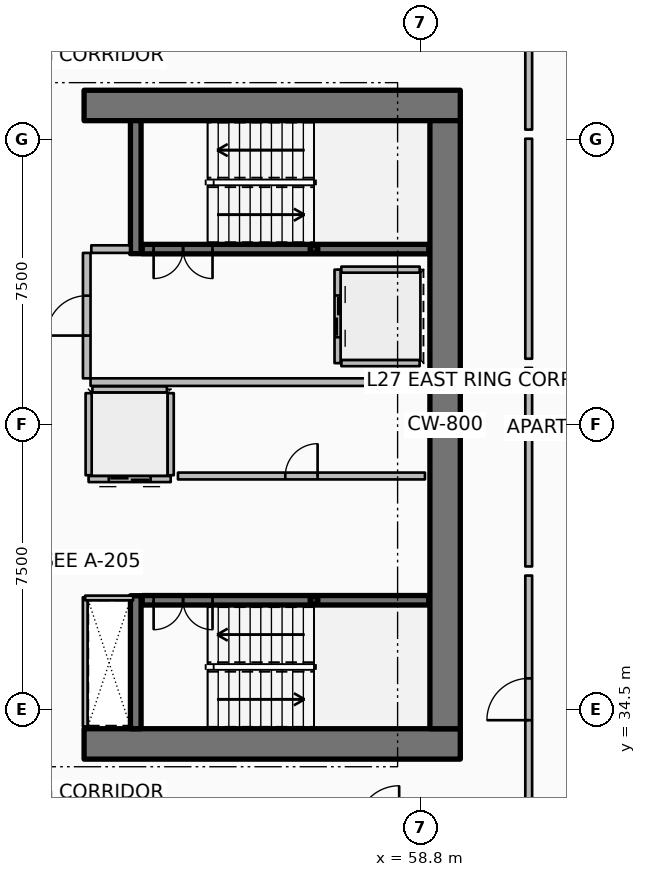
"""IFC4 building model, lengths in metres.
Left out: names, types, materials, properties, quantities, classifications, styles, units other than length and angle.
Written with IfcOpenShell. Run it as: python <this file> out.ifc"""

import sys

from ifc_helpers import new_model, si_unit, direction, frame, frame_2d, origin, origin_2d, place, context, subcontext, project, spatial, rectangle, hollow_rectangle, extrude, element, fill, save


model = new_model("IFC4")
c1 = context("Model", 3, precision=1e-05, world=origin(), true_north=direction((0.0, 1.0)))
c2 = subcontext(c1, "Body", "Model", "MODEL_VIEW")
j1 = project(units=[si_unit("LENGTHUNIT", "METRE"), si_unit("PLANEANGLEUNIT", "RADIAN")], contexts=[c1])
p1 = place(None, origin())
s1 = spatial("IfcSite", under=j1, at=p1, CompositionType="ELEMENT")
p2 = place(p1, origin())
s2 = spatial("IfcBuilding", under=s1, at=p2, CompositionType="ELEMENT")
p3 = place(p2, frame((0.0, 0.0, 108.9)))
s3 = spatial("IfcBuildingStorey", under=s2, at=p3, CompositionType="ELEMENT", Elevation=108.9)
for number, where, z_axis, x_axis in (
    (1, (49.95, 33.6, 0.0), (0.0, 0.0, 1.0), (1.0, 0.0, 0.0)),
    (2, (49.95, 50.4, 0.0), (0.0, 0.0, 1.0), (1.0, 0.0, 0.0)),
):
    element("IfcWall", number, at=place(p3, frame(where, z_axis=z_axis, x_axis=x_axis)), inside=s3, PredefinedType="SHEAR", context=c2, shape_type="SweptSolid", body=[
        extrude(rectangle(XDim=9.9, YDim=0.8, at=frame_2d((4.95, 0.0))), origin(), (0.0, 0.0, 1.0), 3.75),
    ])
p4 = place(p3, frame((59.45, 34.0, 0.0), z_axis=(0.0, 0.0, 1.0), x_axis=(0.0, 1.0, 0.0)))
e3 = element("IfcWall", 3, at=p4, inside=s3, PredefinedType="SHEAR", context=c2, shape_type="SweptSolid", body=[
    extrude(rectangle(XDim=16.0, YDim=0.8, at=frame_2d((8.0, 0.0))), origin(), (0.0, 0.0, 1.0), 3.75),
])
for number, where, z_axis, x_axis in (
    (4, (51.31, 46.5, 0.0), (0.0, 0.0, 1.0), (0.0, 1.0, 0.0)),
    (5, (51.31, 34.0, 0.0), (0.0, 0.0, 1.0), (0.0, 1.0, 0.0)),
):
    element("IfcWall", number, at=place(p3, frame(where, z_axis=z_axis, x_axis=x_axis)), inside=s3, PredefinedType="SHEAR", context=c2, shape_type="SweptSolid", body=[
        extrude(rectangle(XDim=3.5, YDim=0.28, at=frame_2d((1.75, 0.0))), origin(), (0.0, 0.0, 1.0), 3.75),
    ])
for number, where, z_axis, x_axis in (
    (6, (56.0, 46.62, 0.0), (0.0, 0.0, 1.0), (1.0, 0.0, 0.0)),
    (7, (56.0, 37.38, 0.0), (0.0, 0.0, 1.0), (1.0, 0.0, 0.0)),
):
    element("IfcColumn", number, at=place(p3, frame(where, z_axis=z_axis, x_axis=x_axis)), inside=s3, PredefinedType="COLUMN", context=c2, shape_type="SweptSolid", body=[
        extrude(hollow_rectangle(XDim=0.2, YDim=0.2, WallThickness=0.01, InnerFilletRadius=0.01, OuterFilletRadius=0.02, at=origin_2d()), origin(), (0.0, 0.0, 1.0), 1.67),
    ])
p5 = place(p3, frame((51.48, 46.62, 0.0), z_axis=(0.0, 0.0, 1.0), x_axis=(1.0, 0.0, 0.0)))
e8 = element("IfcWall", 8, at=p5, inside=s3, PredefinedType="SOLIDWALL", context=c2, shape_type="SweptSolid", body=[
    extrude(rectangle(XDim=7.54, YDim=0.25, at=frame_2d((3.77, 0.0))), origin(), (0.0, 0.0, 1.0), 3.5),
])
p6 = place(p5, frame((0.3, 0.0, 0.0)))
e9 = element("IfcOpeningElement", 9, at=p6, cuts=e8, PredefinedType="OPENING", context=c2, shape_type="SweptSolid", body=[
    extrude(rectangle(XDim=1.55, YDim=2.15, at=frame_2d((0.775, 1.075))), frame((0.0, 0.135, 0.0), z_axis=(0.0, -1.0, 0.0), x_axis=(1.0, 0.0, 0.0)), (0.0, 0.0, 1.0), 0.27),
])
p7 = place(p3, frame((51.48, 37.38, 0.0), z_axis=(0.0, 0.0, 1.0), x_axis=(1.0, 0.0, 0.0)))
e10 = element("IfcWall", 10, at=p7, inside=s3, PredefinedType="SOLIDWALL", context=c2, shape_type="SweptSolid", body=[
    extrude(rectangle(XDim=7.54, YDim=0.25, at=frame_2d((3.77, 0.0))), origin(), (0.0, 0.0, 1.0), 3.5),
])
p8 = place(p7, frame((0.3, 0.0, 0.0)))
e11 = element("IfcOpeningElement", 11, at=p8, cuts=e10, PredefinedType="OPENING", context=c2, shape_type="SweptSolid", body=[
    extrude(rectangle(XDim=1.55, YDim=2.15, at=frame_2d((0.775, 1.075))), frame((0.0, 0.135, 0.0), z_axis=(0.0, -1.0, 0.0), x_axis=(1.0, 0.0, 0.0)), (0.0, 0.0, 1.0), 0.27),
])
p9 = place(p3, frame((56.62, 46.08, 0.0), z_axis=(0.0, 0.0, 1.0), x_axis=(0.0, -1.0, 0.0)))
e12 = element("IfcWall", 12, at=p9, inside=s3, PredefinedType="PARTITIONING", context=c2, shape_type="SweptSolid", body=[
    extrude(rectangle(XDim=2.46, YDim=0.16, at=frame_2d((1.23, 0.0))), origin(), (0.0, 0.0, 1.0), 3.5),
])
p10 = place(p9, frame((0.68, 0.0, 0.0)))
e13 = element("IfcOpeningElement", 13, at=p10, cuts=e12, PredefinedType="OPENING", context=c2, shape_type="SweptSolid", body=[
    extrude(rectangle(XDim=1.1, YDim=2.1, at=frame_2d((0.55, 1.05))), frame((0.0, 0.09, 0.0), z_axis=(0.0, -1.0, 0.0), x_axis=(1.0, 0.0, 0.0)), (0.0, 0.0, 1.0), 0.18),
])
for number, where, z_axis, x_axis in (
    (14, (56.72, 46.08, 0.0), (0.0, 0.0, 1.0), (1.0, 0.0, 0.0)),
    (15, (56.72, 43.62, 0.0), (0.0, 0.0, 1.0), (1.0, 0.0, 0.0)),
):
    element("IfcWall", number, at=place(p3, frame(where, z_axis=z_axis, x_axis=x_axis)), inside=s3, PredefinedType="PARTITIONING", context=c2, shape_type="SweptSolid", body=[
        extrude(rectangle(XDim=2.06, YDim=0.16, at=frame_2d((1.03, 0.0))), origin(), (0.0, 0.0, 1.0), 3.5),
    ])
p11 = place(p3, frame((52.23, 40.57, 0.0), z_axis=(0.0, 0.0, 1.0), x_axis=(-1.0, 0.0, 0.0)))
e16 = element("IfcWall", 16, at=p11, inside=s3, PredefinedType="PARTITIONING", context=c2, shape_type="SweptSolid", body=[
    extrude(rectangle(XDim=2.16, YDim=0.16, at=frame_2d((1.08, 0.0))), origin(), (0.0, 0.0, 1.0), 3.5),
])
p12 = place(p11, frame((0.53, 0.0, 0.0)))
e17 = element("IfcOpeningElement", 17, at=p12, cuts=e16, PredefinedType="OPENING", context=c2, shape_type="SweptSolid", body=[
    extrude(rectangle(XDim=1.1, YDim=2.1, at=frame_2d((0.55, 1.05))), frame((0.0, 0.09, 0.0), z_axis=(0.0, -1.0, 0.0), x_axis=(1.0, 0.0, 0.0)), (0.0, 0.0, 1.0), 0.18),
])
for number, where, z_axis, x_axis in (
    (18, (52.23, 40.67, 0.0), (0.0, 0.0, 1.0), (0.0, 1.0, 0.0)),
    (19, (50.07, 40.67, 0.0), (0.0, 0.0, 1.0), (0.0, 1.0, 0.0)),
):
    element("IfcWall", number, at=place(p3, frame(where, z_axis=z_axis, x_axis=x_axis)), inside=s3, PredefinedType="PARTITIONING", context=c2, shape_type="SweptSolid", body=[
        extrude(rectangle(XDim=2.16, YDim=0.16, at=frame_2d((1.08, 0.0))), origin(), (0.0, 0.0, 1.0), 3.5),
    ])
p13 = place(p3, frame((50.17, 42.93, 0.0), z_axis=(0.0, 0.0, 1.0), x_axis=(1.0, 0.0, 0.0)))
e20 = element("IfcWall", 20, at=p13, inside=s3, PredefinedType="PARTITIONING", context=c2, shape_type="SweptSolid", body=[
    extrude(rectangle(XDim=1.96, YDim=0.16, at=frame_2d((0.98, 0.0))), origin(), (0.0, 0.0, 1.0), 3.5),
])
p14 = place(p3, frame((52.42, 40.65, 0.0), z_axis=(0.0, 0.0, 1.0), x_axis=(1.0, 0.0, 0.0)))
e21 = element("IfcWall", 21, at=p14, inside=s3, PredefinedType="PARTITIONING", context=c2, shape_type="SweptSolid", body=[
    extrude(rectangle(XDim=6.5, YDim=0.18, at=frame_2d((3.25, 0.0))), origin(), (0.0, 0.0, 1.0), 3.5),
])
p15 = place(p14, frame((2.825, 0.0, 0.0)))
e22 = element("IfcOpeningElement", 22, at=p15, cuts=e21, PredefinedType="OPENING", context=c2, shape_type="SweptSolid", body=[
    extrude(rectangle(XDim=0.85, YDim=2.06, at=frame_2d((0.425, 1.03))), frame((0.0, 0.1, 0.0), z_axis=(0.0, -1.0, 0.0), x_axis=(1.0, 0.0, 0.0)), (0.0, 0.0, 1.0), 0.2),
])
p16 = place(p3, frame((50.12, 43.12, 0.0), z_axis=(0.0, 0.0, 1.0), x_axis=(1.0, 0.0, 0.0)))
e23 = element("IfcWall", 23, at=p16, inside=s3, PredefinedType="PARTITIONING", context=c2, shape_type="SweptSolid", body=[
    extrude(rectangle(XDim=8.88, YDim=0.2, at=frame_2d((4.44, 0.0))), origin(), (0.0, 0.0, 1.0), 3.5),
])
p17 = place(p3, frame((50.14, 46.62, 0.0), z_axis=(0.0, 0.0, 1.0), x_axis=(1.0, 0.0, 0.0)))
e24 = element("IfcWall", 24, at=p17, inside=s3, PredefinedType="PARTITIONING", context=c2, shape_type="SweptSolid", body=[
    extrude(rectangle(XDim=1.02, YDim=0.2, at=frame_2d((0.51, 0.0))), origin(), (0.0, 0.0, 1.0), 3.5),
])
p18 = place(p3, frame((50.02, 43.22, 0.0), z_axis=(0.0, 0.0, 1.0), x_axis=(0.0, 1.0, 0.0)))
e25 = element("IfcWall", 25, at=p18, inside=s3, PredefinedType="PARTITIONING", context=c2, shape_type="SweptSolid", body=[
    extrude(rectangle(XDim=3.3, YDim=0.2, at=frame_2d((1.65, 0.0))), origin(), (0.0, 0.0, 1.0), 3.5),
])
p19 = place(p18, frame((1.125, 0.0, 0.0)))
e26 = element("IfcOpeningElement", 26, at=p19, cuts=e25, PredefinedType="OPENING", context=c2, shape_type="SweptSolid", body=[
    extrude(rectangle(XDim=1.05, YDim=2.1, at=frame_2d((0.525, 1.05))), frame((0.0, 0.11, 0.0), z_axis=(0.0, -1.0, 0.0), x_axis=(1.0, 0.0, 0.0)), (0.0, 0.0, 1.0), 0.22),
])
p20 = place(p3, frame((49.98, 34.06, 0.0), z_axis=(0.0, 0.0, 1.0), x_axis=(0.0, 1.0, 0.0)))
e27 = element("IfcWall", 27, at=p20, inside=s3, PredefinedType="PARTITIONING", context=c2, shape_type="SweptSolid", body=[
    extrude(rectangle(XDim=3.4, YDim=0.125, at=frame_2d((1.7, 0.0))), origin(), (0.0, 0.0, 1.0), 2.94),
])
p21 = place(p3, frame((49.98, 37.44, 0.0), z_axis=(0.0, 0.0, 1.0), x_axis=(1.0, 0.0, 0.0)))
e28 = element("IfcWall", 28, at=p21, inside=s3, PredefinedType="PARTITIONING", context=c2, shape_type="SweptSolid", body=[
    extrude(rectangle(XDim=1.26, YDim=0.125, at=frame_2d((0.63, 0.0))), origin(), (0.0, 0.0, 1.0), 2.94),
])
p22 = place(p3, frame((61.65, 31.52, 0.0), z_axis=(0.0, 0.0, 1.0), x_axis=(0.0, 1.0, 0.0)))
e29 = element("IfcWall", 29, at=p22, inside=s3, PredefinedType="PARTITIONING", context=c2, shape_type="SweptSolid", body=[
    extrude(rectangle(XDim=6.51, YDim=0.18, at=frame_2d((3.255, 0.0))), origin(), (0.0, 0.0, 1.0), 2.94),
])
p23 = place(p22, frame((2.705, 0.0, 0.0)))
e30 = element("IfcOpeningElement", 30, at=p23, cuts=e29, PredefinedType="OPENING", context=c2, shape_type="SweptSolid", body=[
    extrude(rectangle(XDim=1.1, YDim=2.1, at=frame_2d((0.55, 1.05))), frame((0.0, 0.1, 0.0), z_axis=(0.0, -1.0, 0.0), x_axis=(1.0, 0.0, 0.0)), (0.0, 0.0, 1.0), 0.2),
])
p24 = place(p3, frame((61.65, 38.27, 0.0), z_axis=(0.0, 0.0, 1.0), x_axis=(0.0, 1.0, 0.0)))
e31 = element("IfcWall", 31, at=p24, inside=s3, PredefinedType="PARTITIONING", context=c2, shape_type="SweptSolid", body=[
    extrude(rectangle(XDim=5.225, YDim=0.18, at=frame_2d((2.613, 0.0))), origin(), (0.0, 0.0, 1.0), 2.94),
])
p25 = place(p3, frame((61.65, 43.736, 0.0), z_axis=(0.0, 0.0, 1.0), x_axis=(0.0, 1.0, 0.0)))
e32 = element("IfcWall", 32, at=p25, inside=s3, PredefinedType="PARTITIONING", context=c2, shape_type="SweptSolid", body=[
    extrude(rectangle(XDim=5.789, YDim=0.18, at=frame_2d((2.895, 0.0))), origin(), (0.0, 0.0, 1.0), 2.94),
])
p26 = place(p3, frame((61.65, 49.764, 0.0), z_axis=(0.0, 0.0, 1.0), x_axis=(0.0, 1.0, 0.0)))
e33 = element("IfcWall", 33, at=p26, inside=s3, PredefinedType="PARTITIONING", context=c2, shape_type="SweptSolid", body=[
    extrude(rectangle(XDim=2.716, YDim=0.18, at=frame_2d((1.358, 0.0))), origin(), (0.0, 0.0, 1.0), 2.94),
])
p27 = place(p6, origin())
e34 = element("IfcDoor", 34, at=p27, inside=s3, OperationType="DOUBLE_DOOR_SINGLE_SWING", PredefinedType="DOOR", context=c2, shape_type="SweptSolid", body=[
    extrude(rectangle(XDim=1.55, YDim=2.15, at=frame_2d((0.775, 1.075))), frame((0.0, 0.025, 0.0), z_axis=(0.0, -1.0, 0.0), x_axis=(1.0, 0.0, 0.0)), (0.0, 0.0, 1.0), 0.05),
])
fill(e9, e34)
p28 = place(p8, origin())
e35 = element("IfcDoor", 35, at=p28, inside=s3, OperationType="DOUBLE_DOOR_SINGLE_SWING", PredefinedType="DOOR", context=c2, shape_type="SweptSolid", body=[
    extrude(rectangle(XDim=1.55, YDim=2.15, at=frame_2d((0.775, 1.075))), frame((0.0, 0.025, 0.0), z_axis=(0.0, -1.0, 0.0), x_axis=(1.0, 0.0, 0.0)), (0.0, 0.0, 1.0), 0.05),
])
fill(e11, e35)
p29 = place(p10, origin())
e36 = element("IfcDoor", 36, at=p29, inside=s3, OperationType="DOUBLE_DOOR_SLIDING", PredefinedType="DOOR", context=c2, shape_type="SweptSolid", body=[
    extrude(rectangle(XDim=1.1, YDim=2.1, at=frame_2d((0.55, 1.05))), frame((0.0, 0.025, 0.0), z_axis=(0.0, -1.0, 0.0), x_axis=(1.0, 0.0, 0.0)), (0.0, 0.0, 1.0), 0.05),
])
fill(e13, e36)
p30 = place(p12, origin())
e37 = element("IfcDoor", 37, at=p30, inside=s3, OperationType="DOUBLE_DOOR_SLIDING", PredefinedType="DOOR", context=c2, shape_type="SweptSolid", body=[
    extrude(rectangle(XDim=1.1, YDim=2.1, at=frame_2d((0.55, 1.05))), frame((0.0, 0.025, 0.0), z_axis=(0.0, -1.0, 0.0), x_axis=(1.0, 0.0, 0.0)), (0.0, 0.0, 1.0), 0.05),
])
fill(e17, e37)
p31 = place(p15, origin())
e38 = element("IfcDoor", 38, at=p31, inside=s3, OperationType="SINGLE_SWING_RIGHT", PredefinedType="DOOR", context=c2, shape_type="SweptSolid", body=[
    extrude(rectangle(XDim=0.85, YDim=2.06, at=frame_2d((0.425, 1.03))), frame((0.0, 0.025, 0.0), z_axis=(0.0, -1.0, 0.0), x_axis=(1.0, 0.0, 0.0)), (0.0, 0.0, 1.0), 0.05),
])
fill(e22, e38)
p32 = place(p19, origin())
e39 = element("IfcDoor", 39, at=p32, inside=s3, OperationType="SINGLE_SWING_LEFT", PredefinedType="DOOR", context=c2, shape_type="SweptSolid", body=[
    extrude(rectangle(XDim=1.05, YDim=2.1, at=frame_2d((0.525, 1.05))), frame((0.0, 0.025, 0.0), z_axis=(0.0, -1.0, 0.0), x_axis=(1.0, 0.0, 0.0)), (0.0, 0.0, 1.0), 0.05),
])
fill(e26, e39)
p33 = place(p23, origin())
e40 = element("IfcDoor", 40, at=p33, inside=s3, OperationType="SINGLE_SWING_LEFT", PredefinedType="DOOR", context=c2, shape_type="SweptSolid", body=[
    extrude(rectangle(XDim=1.1, YDim=2.1, at=frame_2d((0.55, 1.05))), frame((0.0, 0.025, 0.0), z_axis=(0.0, -1.0, 0.0), x_axis=(1.0, 0.0, 0.0)), (0.0, 0.0, 1.0), 0.05),
])
fill(e30, e40)
save(model, sys.argv[1])
